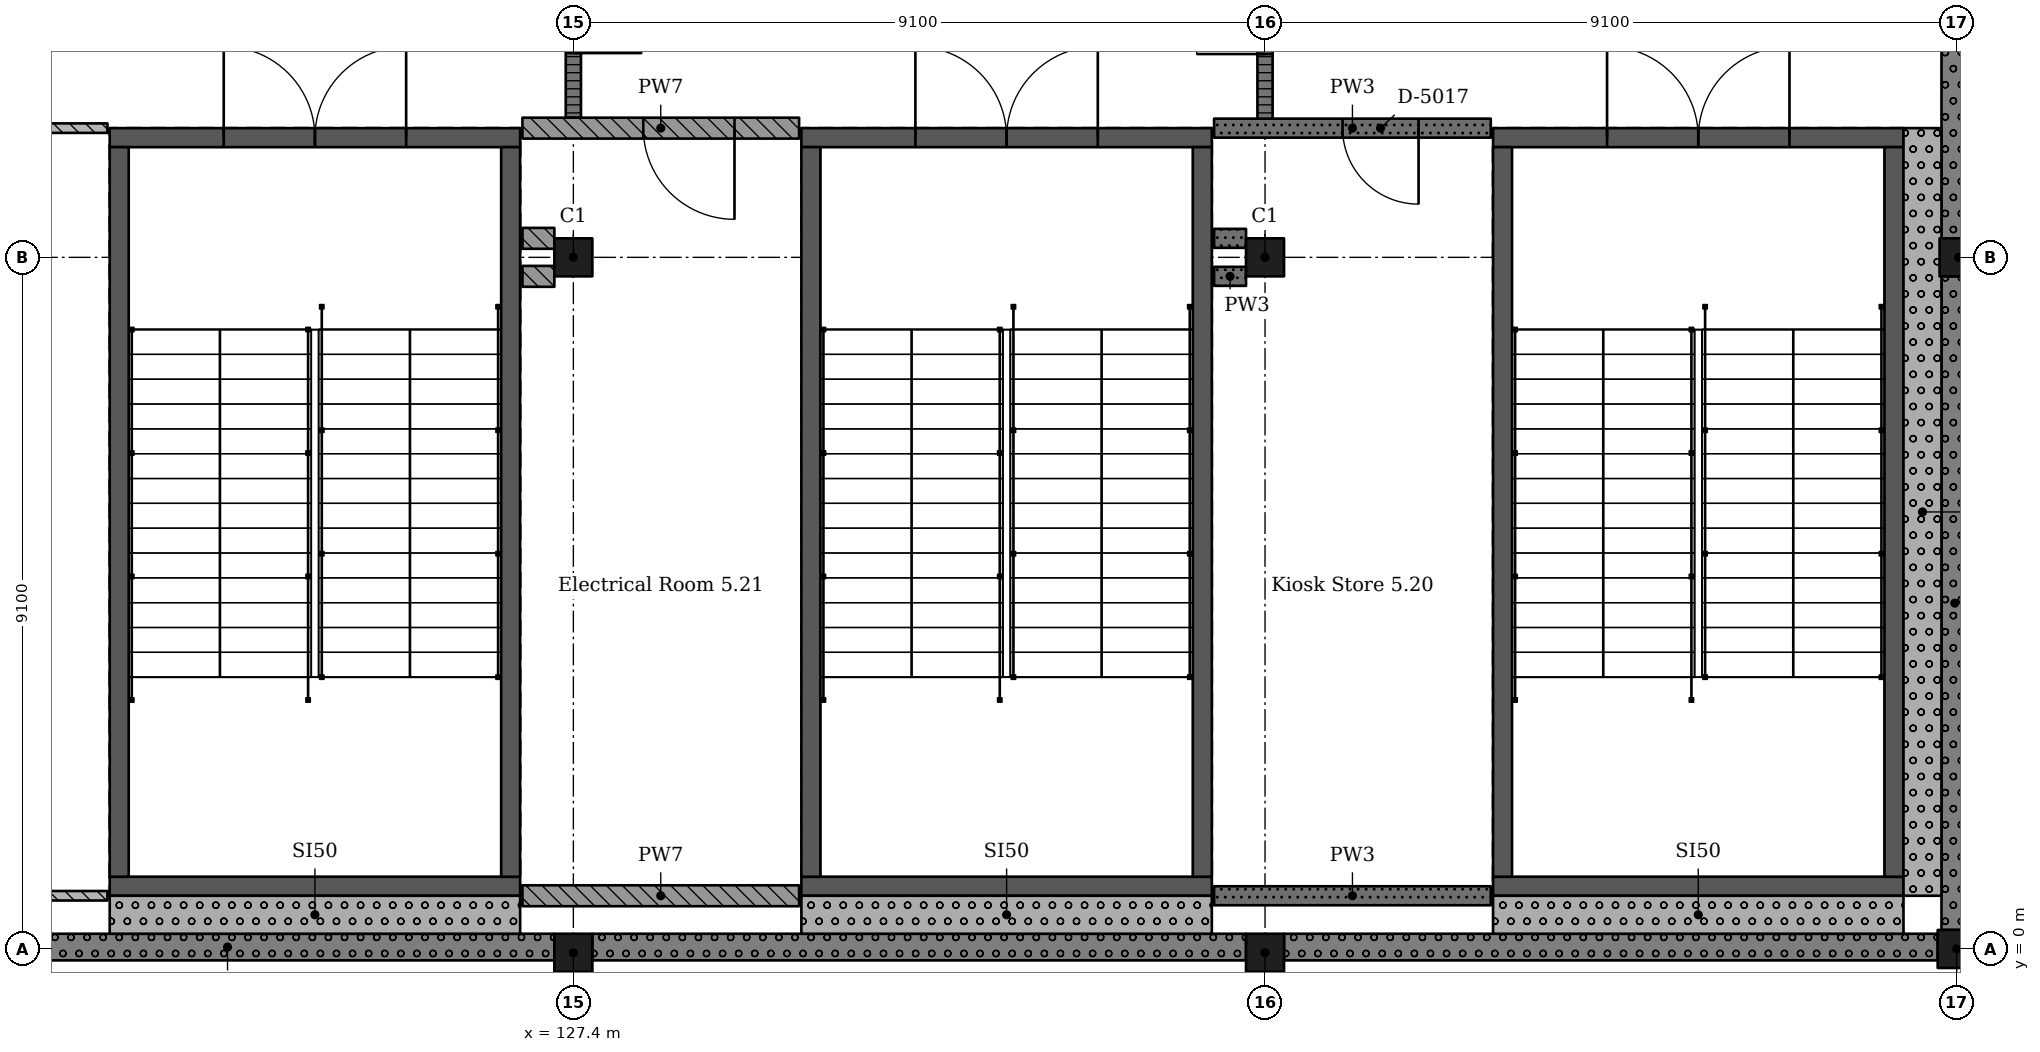
"""IFC4 building model, lengths in metres.
Left out: names, types, materials, properties, quantities, classifications, styles, units other than length and angle.
Written with IfcOpenShell. Run it as: python <this file> out.ifc"""

import sys

from ifc_helpers import new_model, si_unit, direction, frame, frame_2d, origin, origin_2d, place, context, subcontext, project, spatial, rectangle, extrude, element, fill, save


model = new_model("IFC4")
c1 = context("Model", 3, precision=1e-05, world=origin(), true_north=direction((0.0, 1.0)))
c2 = subcontext(c1, "Body", "Model", "MODEL_VIEW")
j1 = project(units=[si_unit("LENGTHUNIT", "METRE"), si_unit("PLANEANGLEUNIT", "RADIAN")], contexts=[c1])
p1 = place(None, origin())
s1 = spatial("IfcSite", under=j1, at=p1, CompositionType="ELEMENT")
p2 = place(p1, origin())
s2 = spatial("IfcBuilding", under=s1, at=p2, CompositionType="ELEMENT")
p3 = place(p2, frame((0.0, 0.0, 24.57)))
s3 = spatial("IfcBuildingStorey", under=s2, at=p3, CompositionType="ELEMENT", Elevation=24.57)
for number, where, z_axis, x_axis in (
    (1, (127.4, -0.05, 0.0), (0.0, 0.0, 1.0), (1.0, 0.0, 0.0)),
    (2, (127.4, 9.1, 0.0), (0.0, 0.0, 1.0), (1.0, 0.0, 0.0)),
    (3, (136.5, -0.05, 0.0), (0.0, 0.0, 1.0), (1.0, 0.0, 0.0)),
    (4, (136.5, 9.1, 0.0), (0.0, 0.0, 1.0), (1.0, 0.0, 0.0)),
    (5, (145.6, 0.0, 0.0), (0.0, 0.0, 1.0), (1.0, 0.0, 0.0)),
    (6, (145.625, 9.1, 0.0), (0.0, 0.0, 1.0), (1.0, 0.0, 0.0)),
):
    element("IfcColumn", number, at=place(p3, frame(where, z_axis=z_axis, x_axis=x_axis)), inside=s3, PredefinedType="COLUMN", context=c2, shape_type="SweptSolid", body=[
        extrude(rectangle(XDim=0.5, YDim=0.5, at=origin_2d()), origin(), (0.0, 0.0, 1.0), 4.55),
    ])
p4 = place(p3, frame((144.9, 0.825, 0.0), z_axis=(0.0, 0.0, 1.0), x_axis=(-1.0, 0.0, 0.0)))
e7 = element("IfcWall", 7, at=p4, inside=s3, PredefinedType="SHEAR", context=c2, shape_type="SweptSolid", body=[
    extrude(rectangle(XDim=5.4, YDim=0.25, at=frame_2d((2.7, 0.0))), origin(), (0.0, 0.0, 1.0), 4.55),
])
p5 = place(p3, frame((144.9, 10.675, 0.0), z_axis=(0.0, 0.0, 1.0), x_axis=(-1.0, 0.0, 0.0)))
e8 = element("IfcWall", 8, at=p5, inside=s3, PredefinedType="SHEAR", context=c2, shape_type="SweptSolid", body=[
    extrude(rectangle(XDim=5.4, YDim=0.25, at=frame_2d((2.7, 0.0))), origin(), (0.0, 0.0, 1.0), 4.55),
])
p6 = place(p5, frame((1.5, 0.0, 0.0)))
e9 = element("IfcOpeningElement", 9, at=p6, cuts=e8, PredefinedType="OPENING", context=c2, shape_type="SweptSolid", body=[
    extrude(rectangle(XDim=2.4, YDim=2.1, at=frame_2d((1.2, 1.05))), frame((0.0, 0.135, 0.0), z_axis=(0.0, -1.0, 0.0), x_axis=(1.0, 0.0, 0.0)), (0.0, 0.0, 1.0), 0.27),
])
for number, where, z_axis, x_axis in (
    (10, (139.625, 10.55, 0.0), (0.0, 0.0, 1.0), (0.0, -1.0, 0.0)),
    (11, (144.775, 10.55, 0.0), (0.0, 0.0, 1.0), (0.0, -1.0, 0.0)),
):
    element("IfcWall", number, at=place(p3, frame(where, z_axis=z_axis, x_axis=x_axis)), inside=s3, PredefinedType="SHEAR", context=c2, shape_type="SweptSolid", body=[
        extrude(rectangle(XDim=9.6, YDim=0.25, at=frame_2d((4.8, 0.0))), origin(), (0.0, 0.0, 1.0), 4.55),
    ])
p7 = place(p3, frame((135.8, 0.825, 0.0), z_axis=(0.0, 0.0, 1.0), x_axis=(-1.0, 0.0, 0.0)))
e12 = element("IfcWall", 12, at=p7, inside=s3, PredefinedType="SHEAR", context=c2, shape_type="SweptSolid", body=[
    extrude(rectangle(XDim=5.4, YDim=0.25, at=frame_2d((2.7, 0.0))), origin(), (0.0, 0.0, 1.0), 4.55),
])
p8 = place(p3, frame((135.8, 10.675, 0.0), z_axis=(0.0, 0.0, 1.0), x_axis=(-1.0, 0.0, 0.0)))
e13 = element("IfcWall", 13, at=p8, inside=s3, PredefinedType="SHEAR", context=c2, shape_type="SweptSolid", body=[
    extrude(rectangle(XDim=5.4, YDim=0.25, at=frame_2d((2.7, 0.0))), origin(), (0.0, 0.0, 1.0), 4.55),
])
p9 = place(p8, frame((1.5, 0.0, 0.0)))
e14 = element("IfcOpeningElement", 14, at=p9, cuts=e13, PredefinedType="OPENING", context=c2, shape_type="SweptSolid", body=[
    extrude(rectangle(XDim=2.4, YDim=2.1, at=frame_2d((1.2, 1.05))), frame((0.0, 0.135, 0.0), z_axis=(0.0, -1.0, 0.0), x_axis=(1.0, 0.0, 0.0)), (0.0, 0.0, 1.0), 0.27),
])
for number, where, z_axis, x_axis in (
    (15, (130.525, 10.55, 0.0), (0.0, 0.0, 1.0), (0.0, -1.0, 0.0)),
    (16, (135.675, 10.55, 0.0), (0.0, 0.0, 1.0), (0.0, -1.0, 0.0)),
):
    element("IfcWall", number, at=place(p3, frame(where, z_axis=z_axis, x_axis=x_axis)), inside=s3, PredefinedType="SHEAR", context=c2, shape_type="SweptSolid", body=[
        extrude(rectangle(XDim=9.6, YDim=0.25, at=frame_2d((4.8, 0.0))), origin(), (0.0, 0.0, 1.0), 4.55),
    ])
p10 = place(p3, frame((126.7, 0.825, 0.0), z_axis=(0.0, 0.0, 1.0), x_axis=(-1.0, 0.0, 0.0)))
e17 = element("IfcWall", 17, at=p10, inside=s3, PredefinedType="SHEAR", context=c2, shape_type="SweptSolid", body=[
    extrude(rectangle(XDim=5.4, YDim=0.25, at=frame_2d((2.7, 0.0))), origin(), (0.0, 0.0, 1.0), 4.55),
])
p11 = place(p3, frame((126.7, 10.675, 0.0), z_axis=(0.0, 0.0, 1.0), x_axis=(-1.0, 0.0, 0.0)))
e18 = element("IfcWall", 18, at=p11, inside=s3, PredefinedType="SHEAR", context=c2, shape_type="SweptSolid", body=[
    extrude(rectangle(XDim=5.4, YDim=0.25, at=frame_2d((2.7, 0.0))), origin(), (0.0, 0.0, 1.0), 4.55),
])
p12 = place(p11, frame((1.5, 0.0, 0.0)))
e19 = element("IfcOpeningElement", 19, at=p12, cuts=e18, PredefinedType="OPENING", context=c2, shape_type="SweptSolid", body=[
    extrude(rectangle(XDim=2.4, YDim=2.1, at=frame_2d((1.2, 1.05))), frame((0.0, 0.135, 0.0), z_axis=(0.0, -1.0, 0.0), x_axis=(1.0, 0.0, 0.0)), (0.0, 0.0, 1.0), 0.27),
])
for number, where, z_axis, x_axis in (
    (20, (121.425, 10.55, 0.0), (0.0, 0.0, 1.0), (0.0, -1.0, 0.0)),
    (21, (126.575, 10.55, 0.0), (0.0, 0.0, 1.0), (0.0, -1.0, 0.0)),
):
    element("IfcWall", number, at=place(p3, frame(where, z_axis=z_axis, x_axis=x_axis)), inside=s3, PredefinedType="SHEAR", context=c2, shape_type="SweptSolid", body=[
        extrude(rectangle(XDim=9.6, YDim=0.25, at=frame_2d((4.8, 0.0))), origin(), (0.0, 0.0, 1.0), 4.55),
    ])
p13 = place(p3, frame((118.55, 0.025, 0.0), z_axis=(0.0, 0.0, 1.0), x_axis=(1.0, 0.0, 0.0)))
e22 = element("IfcWall", 22, at=p13, inside=s3, PredefinedType="SOLIDWALL", context=c2, shape_type="SweptSolid", body=[
    extrude(rectangle(XDim=8.6, YDim=0.35, at=frame_2d((4.3, 0.0))), origin(), (0.0, 0.0, 1.0), 3.6),
])
for number, where, z_axis, x_axis in (
    (23, (127.65, 0.025, 0.0), (0.0, 0.0, 1.0), (1.0, 0.0, 0.0)),
    (24, (136.75, 0.025, 0.0), (0.0, 0.0, 1.0), (1.0, 0.0, 0.0)),
    (25, (145.575, 0.25, 0.0), (0.0, 0.0, 1.0), (0.0, 1.0, 0.0)),
):
    element("IfcWall", number, at=place(p3, frame(where, z_axis=z_axis, x_axis=x_axis)), inside=s3, PredefinedType="SOLIDWALL", context=c2, shape_type="SweptSolid", body=[
        extrude(rectangle(XDim=8.6, YDim=0.35, at=frame_2d((4.3, 0.0))), origin(), (0.0, 0.0, 1.0), 3.6),
    ])
p14 = place(p3, frame((145.575, 9.35, 0.0), z_axis=(0.0, 0.0, 1.0), x_axis=(0.0, 1.0, 0.0)))
e26 = element("IfcWall", 26, at=p14, inside=s3, PredefinedType="SOLIDWALL", context=c2, shape_type="SweptSolid", body=[
    extrude(rectangle(XDim=8.6, YDim=0.35, at=frame_2d((4.3, 0.0))), origin(), (0.0, 0.0, 1.0), 3.6),
])
p15 = place(p3, frame((139.5, 0.45, 0.0), z_axis=(0.0, 0.0, 1.0), x_axis=(1.0, 0.0, 0.0)))
e27 = element("IfcWall", 27, at=p15, inside=s3, PredefinedType="SOLIDWALL", context=c2, shape_type="SweptSolid", body=[
    extrude(rectangle(XDim=5.4, YDim=0.5, at=frame_2d((2.7, 0.0))), origin(), (0.0, 0.0, 1.0), 4.35),
])
p16 = place(p3, frame((145.15, 0.7, 0.0), z_axis=(0.0, 0.0, 1.0), x_axis=(0.0, 1.0, 0.0)))
e28 = element("IfcWall", 28, at=p16, inside=s3, PredefinedType="SOLIDWALL", context=c2, shape_type="SweptSolid", body=[
    extrude(rectangle(XDim=10.1, YDim=0.5, at=frame_2d((5.05, 0.0))), origin(), (0.0, 0.0, 1.0), 4.55),
])
p17 = place(p3, frame((130.4, 0.45, 0.0), z_axis=(0.0, 0.0, 1.0), x_axis=(1.0, 0.0, 0.0)))
e29 = element("IfcWall", 29, at=p17, inside=s3, PredefinedType="SOLIDWALL", context=c2, shape_type="SweptSolid", body=[
    extrude(rectangle(XDim=5.4, YDim=0.5, at=frame_2d((2.7, 0.0))), origin(), (0.0, 0.0, 1.0), 4.35),
])
p18 = place(p3, frame((121.3, 0.45, 0.0), z_axis=(0.0, 0.0, 1.0), x_axis=(1.0, 0.0, 0.0)))
e30 = element("IfcWall", 30, at=p18, inside=s3, PredefinedType="SOLIDWALL", context=c2, shape_type="SweptSolid", body=[
    extrude(rectangle(XDim=5.4, YDim=0.5, at=frame_2d((2.7, 0.0))), origin(), (0.0, 0.0, 1.0), 4.35),
])
p19 = place(p3, frame((121.27, 0.7, 0.0), z_axis=(0.0, 0.0, 1.0), x_axis=(-1.0, 0.0, 0.0)))
e31 = element("IfcWall", 31, at=p19, inside=s3, PredefinedType="PARTITIONING", context=c2, shape_type="SweptSolid", body=[
    extrude(rectangle(XDim=3.64, YDim=0.125, at=frame_2d((1.82, 0.0))), origin(), (0.0, 0.0, 1.0), 4.35),
])
p20 = place(p3, frame((121.27, 10.8, 0.0), z_axis=(0.0, 0.0, 1.0), x_axis=(-1.0, 0.0, 0.0)))
e32 = element("IfcWall", 32, at=p20, inside=s3, PredefinedType="PARTITIONING", context=c2, shape_type="SweptSolid", body=[
    extrude(rectangle(XDim=3.64, YDim=0.125, at=frame_2d((1.82, 0.0))), origin(), (0.0, 0.0, 1.0), 4.35),
])
p21 = place(p20, frame((1.35, 0.0, 0.0)))
e33 = element("IfcOpeningElement", 33, at=p21, cuts=e32, PredefinedType="OPENING", context=c2, shape_type="SweptSolid", body=[
    extrude(rectangle(XDim=0.9, YDim=2.1, at=frame_2d((0.45, 1.05))), frame((0.0, 0.073, 0.0), z_axis=(0.0, -1.0, 0.0), x_axis=(1.0, 0.0, 0.0)), (0.0, 0.0, 1.0), 0.145),
])
for number, where, z_axis, x_axis in (
    (34, (126.73, 8.85, 0.0), (0.0, 0.0, 1.0), (1.0, 0.0, 0.0)),
    (35, (127.15, 9.35, 0.0), (0.0, 0.0, 1.0), (-1.0, 0.0, 0.0)),
):
    element("IfcWall", number, at=place(p3, frame(where, z_axis=z_axis, x_axis=x_axis)), inside=s3, PredefinedType="SOLIDWALL", context=c2, shape_type="SweptSolid", body=[
        extrude(rectangle(XDim=0.42, YDim=0.275, at=frame_2d((0.21, 0.0))), origin(), (0.0, 0.0, 1.0), 4.35),
    ])
p22 = place(p3, frame((126.73, 10.8, 0.0), z_axis=(0.0, 0.0, 1.0), x_axis=(1.0, 0.0, 0.0)))
e36 = element("IfcWall", 36, at=p22, inside=s3, PredefinedType="SOLIDWALL", context=c2, shape_type="SweptSolid", body=[
    extrude(rectangle(XDim=3.64, YDim=0.275, at=frame_2d((1.82, 0.0))), origin(), (0.0, 0.0, 1.0), 4.35),
])
p23 = place(p22, frame((1.59, 0.0, 0.0)))
e37 = element("IfcOpeningElement", 37, at=p23, cuts=e36, PredefinedType="OPENING", context=c2, shape_type="SweptSolid", body=[
    extrude(rectangle(XDim=1.2, YDim=2.4, at=frame_2d((0.6, 1.2))), frame((0.0, 0.147, 0.0), z_axis=(0.0, -1.0, 0.0), x_axis=(1.0, 0.0, 0.0)), (0.0, 0.0, 1.0), 0.295),
])
p24 = place(p3, frame((127.4, 10.938, 0.0), z_axis=(0.0, 0.0, 1.0), x_axis=(0.0, 1.0, 0.0)))
e38 = element("IfcWall", 38, at=p24, inside=s3, PredefinedType="PARTITIONING", context=c2, shape_type="SweptSolid", body=[
    extrude(rectangle(XDim=7.012, YDim=0.2, at=frame_2d((3.506, 0.0))), origin(), (0.0, 0.0, 1.0), 3.6),
])
p25 = place(p24, frame((0.85, 0.0, 0.0)))
e39 = element("IfcOpeningElement", 39, at=p25, cuts=e38, PredefinedType="OPENING", context=c2, shape_type="SweptSolid", body=[
    extrude(rectangle(XDim=1.8, YDim=2.4, at=frame_2d((0.9, 1.2))), frame((0.0, 0.11, 0.0), z_axis=(0.0, -1.0, 0.0), x_axis=(1.0, 0.0, 0.0)), (0.0, 0.0, 1.0), 0.22),
])
p26 = place(p24, frame((4.35, 0.0, 0.0)))
e40 = element("IfcOpeningElement", 40, at=p26, cuts=e38, PredefinedType="OPENING", context=c2, shape_type="SweptSolid", body=[
    extrude(rectangle(XDim=1.8, YDim=2.4, at=frame_2d((0.9, 1.2))), frame((0.0, 0.11, 0.0), z_axis=(0.0, -1.0, 0.0), x_axis=(1.0, 0.0, 0.0)), (0.0, 0.0, 1.0), 0.22),
])
p27 = place(p3, frame((130.37, 0.7, 0.0), z_axis=(0.0, 0.0, 1.0), x_axis=(-1.0, 0.0, 0.0)))
e41 = element("IfcWall", 41, at=p27, inside=s3, PredefinedType="SOLIDWALL", context=c2, shape_type="SweptSolid", body=[
    extrude(rectangle(XDim=3.64, YDim=0.275, at=frame_2d((1.82, 0.0))), origin(), (0.0, 0.0, 1.0), 4.35),
])
for number, where, z_axis, x_axis in (
    (42, (135.83, 8.85, 0.0), (0.0, 0.0, 1.0), (1.0, 0.0, 0.0)),
    (43, (136.25, 9.35, 0.0), (0.0, 0.0, 1.0), (-1.0, 0.0, 0.0)),
):
    element("IfcWall", number, at=place(p3, frame(where, z_axis=z_axis, x_axis=x_axis)), inside=s3, PredefinedType="SOLIDWALL", context=c2, shape_type="SweptSolid", body=[
        extrude(rectangle(XDim=0.42, YDim=0.25, at=frame_2d((0.21, 0.0))), origin(), (0.0, 0.0, 1.0), 4.35),
    ])
p28 = place(p3, frame((135.83, 10.8, 0.0), z_axis=(0.0, 0.0, 1.0), x_axis=(1.0, 0.0, 0.0)))
e44 = element("IfcWall", 44, at=p28, inside=s3, PredefinedType="SOLIDWALL", context=c2, shape_type="SweptSolid", body=[
    extrude(rectangle(XDim=3.64, YDim=0.25, at=frame_2d((1.82, 0.0))), origin(), (0.0, 0.0, 1.0), 4.35),
])
p29 = place(p28, frame((1.69, 0.0, 0.0)))
e45 = element("IfcOpeningElement", 45, at=p29, cuts=e44, PredefinedType="OPENING", context=c2, shape_type="SweptSolid", body=[
    extrude(rectangle(XDim=1.0, YDim=2.1, at=frame_2d((0.5, 1.05))), frame((0.0, 0.135, 0.0), z_axis=(0.0, -1.0, 0.0), x_axis=(1.0, 0.0, 0.0)), (0.0, 0.0, 1.0), 0.27),
])
p30 = place(p3, frame((136.5, 10.925, 0.0), z_axis=(0.0, 0.0, 1.0), x_axis=(0.0, 1.0, 0.0)))
e46 = element("IfcWall", 46, at=p30, inside=s3, PredefinedType="PARTITIONING", context=c2, shape_type="SweptSolid", body=[
    extrude(rectangle(XDim=7.025, YDim=0.2, at=frame_2d((3.512, 0.0))), origin(), (0.0, 0.0, 1.0), 3.6),
])
p31 = place(p30, frame((0.85, 0.0, 0.0)))
e47 = element("IfcOpeningElement", 47, at=p31, cuts=e46, PredefinedType="OPENING", context=c2, shape_type="SweptSolid", body=[
    extrude(rectangle(XDim=1.8, YDim=2.4, at=frame_2d((0.9, 1.2))), frame((0.0, 0.11, 0.0), z_axis=(0.0, -1.0, 0.0), x_axis=(1.0, 0.0, 0.0)), (0.0, 0.0, 1.0), 0.22),
])
p32 = place(p30, frame((4.35, 0.0, 0.0)))
e48 = element("IfcOpeningElement", 48, at=p32, cuts=e46, PredefinedType="OPENING", context=c2, shape_type="SweptSolid", body=[
    extrude(rectangle(XDim=1.8, YDim=2.4, at=frame_2d((0.9, 1.2))), frame((0.0, 0.11, 0.0), z_axis=(0.0, -1.0, 0.0), x_axis=(1.0, 0.0, 0.0)), (0.0, 0.0, 1.0), 0.22),
])
p33 = place(p3, frame((139.47, 0.7, 0.0), z_axis=(0.0, 0.0, 1.0), x_axis=(-1.0, 0.0, 0.0)))
e49 = element("IfcWall", 49, at=p33, inside=s3, PredefinedType="SOLIDWALL", context=c2, shape_type="SweptSolid", body=[
    extrude(rectangle(XDim=3.64, YDim=0.25, at=frame_2d((1.82, 0.0))), origin(), (0.0, 0.0, 1.0), 4.35),
])
p34 = place(p29, origin())
e50 = element("IfcDoor", 50, at=p34, inside=s3, OperationType="SINGLE_SWING_RIGHT", PredefinedType="DOOR", context=c2, shape_type="SweptSolid", body=[
    extrude(rectangle(XDim=1.0, YDim=2.1, at=frame_2d((0.5, 1.05))), frame((0.0, 0.025, 0.0), z_axis=(0.0, -1.0, 0.0), x_axis=(1.0, 0.0, 0.0)), (0.0, 0.0, 1.0), 0.05),
])
fill(e45, e50)
p35 = place(p23, origin())
e51 = element("IfcDoor", 51, at=p35, inside=s3, OperationType="SINGLE_SWING_RIGHT", PredefinedType="DOOR", context=c2, shape_type="SweptSolid", body=[
    extrude(rectangle(XDim=1.2, YDim=2.4, at=frame_2d((0.6, 1.2))), frame((0.0, 0.025, 0.0), z_axis=(0.0, -1.0, 0.0), x_axis=(1.0, 0.0, 0.0)), (0.0, 0.0, 1.0), 0.05),
])
fill(e37, e51)
p36 = place(p31, origin())
e52 = element("IfcDoor", 52, at=p36, inside=s3, OperationType="DOUBLE_DOOR_SINGLE_SWING", PredefinedType="DOOR", context=c2, shape_type="SweptSolid", body=[
    extrude(rectangle(XDim=1.8, YDim=2.4, at=frame_2d((0.9, 1.2))), frame((0.0, 0.025, 0.0), z_axis=(0.0, -1.0, 0.0), x_axis=(1.0, 0.0, 0.0)), (0.0, 0.0, 1.0), 0.05),
])
fill(e47, e52)
p37 = place(p25, origin())
e53 = element("IfcDoor", 53, at=p37, inside=s3, OperationType="DOUBLE_DOOR_SINGLE_SWING", PredefinedType="DOOR", context=c2, shape_type="SweptSolid", body=[
    extrude(rectangle(XDim=1.8, YDim=2.4, at=frame_2d((0.9, 1.2))), frame((0.0, 0.025, 0.0), z_axis=(0.0, -1.0, 0.0), x_axis=(1.0, 0.0, 0.0)), (0.0, 0.0, 1.0), 0.05),
])
fill(e39, e53)
p38 = place(p6, origin())
e54 = element("IfcDoor", 54, at=p38, inside=s3, OperationType="DOUBLE_DOOR_SINGLE_SWING", PredefinedType="DOOR", context=c2, shape_type="SweptSolid", body=[
    extrude(rectangle(XDim=2.4, YDim=2.1, at=frame_2d((1.2, 1.05))), frame((0.0, 0.025, 0.0), z_axis=(0.0, -1.0, 0.0), x_axis=(1.0, 0.0, 0.0)), (0.0, 0.0, 1.0), 0.05),
])
fill(e9, e54)
p39 = place(p9, origin())
e55 = element("IfcDoor", 55, at=p39, inside=s3, OperationType="DOUBLE_DOOR_SINGLE_SWING", PredefinedType="DOOR", context=c2, shape_type="SweptSolid", body=[
    extrude(rectangle(XDim=2.4, YDim=2.1, at=frame_2d((1.2, 1.05))), frame((0.0, 0.025, 0.0), z_axis=(0.0, -1.0, 0.0), x_axis=(1.0, 0.0, 0.0)), (0.0, 0.0, 1.0), 0.05),
])
fill(e14, e55)
p40 = place(p12, origin())
e56 = element("IfcDoor", 56, at=p40, inside=s3, OperationType="DOUBLE_DOOR_SINGLE_SWING", PredefinedType="DOOR", context=c2, shape_type="SweptSolid", body=[
    extrude(rectangle(XDim=2.4, YDim=2.1, at=frame_2d((1.2, 1.05))), frame((0.0, 0.025, 0.0), z_axis=(0.0, -1.0, 0.0), x_axis=(1.0, 0.0, 0.0)), (0.0, 0.0, 1.0), 0.05),
])
fill(e19, e56)
save(model, sys.argv[1])
